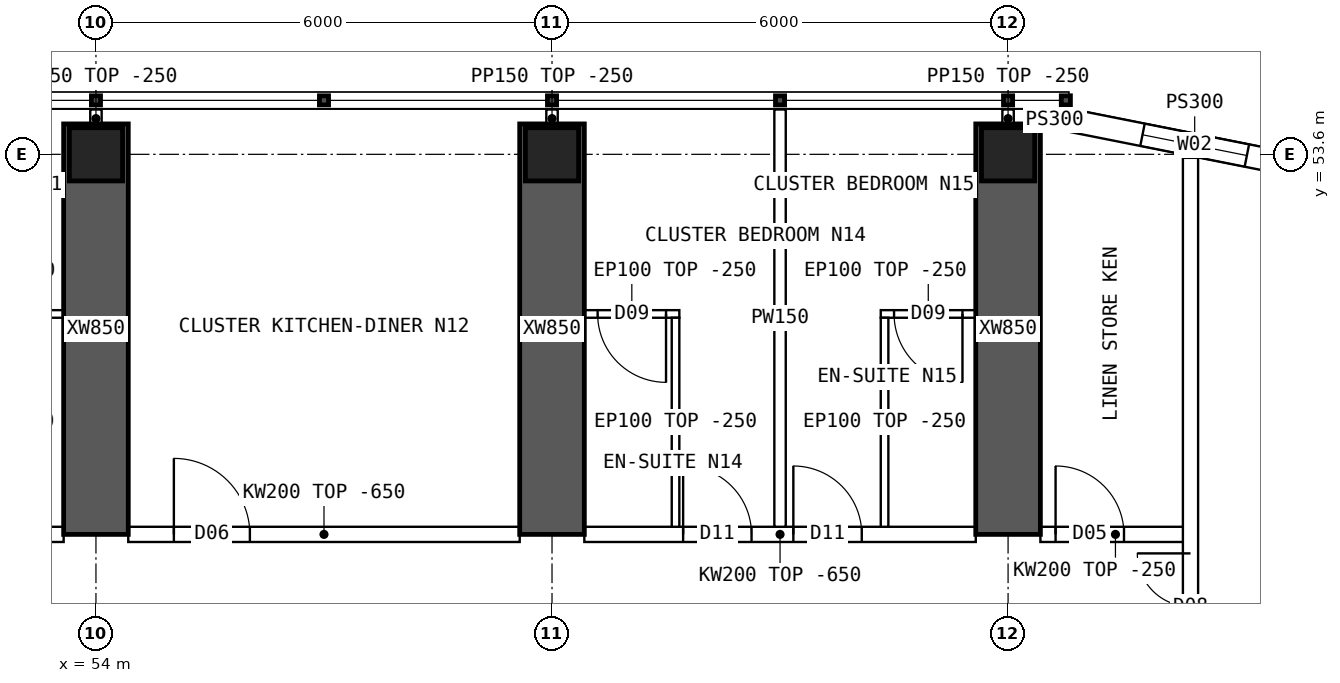
"""IFC4 building model, lengths in metres.
Left out: names, types, materials, properties, quantities, classifications, styles, units other than length and angle.
Written with IfcOpenShell. Run it as: python <this file> out.ifc"""

import sys

from ifc_helpers import new_model, si_unit, direction, frame, frame_2d, origin, origin_2d, place, context, subcontext, project, spatial, polyline, rectangle, hollow_rectangle, outline, extrude, element, fill, save


model = new_model("IFC4")
c1 = context("Model", 3, precision=1e-05, world=origin(), true_north=direction((0.0, 1.0)))
c2 = subcontext(c1, "Body", "Model", "MODEL_VIEW")
j1 = project(units=[si_unit("LENGTHUNIT", "METRE"), si_unit("PLANEANGLEUNIT", "RADIAN")], contexts=[c1])
p1 = place(None, origin())
s1 = spatial("IfcSite", under=j1, at=p1, CompositionType="ELEMENT")
p2 = place(p1, origin())
s2 = spatial("IfcBuilding", under=s1, at=p2, CompositionType="ELEMENT")
p3 = place(p2, frame((0.0, 0.0, 167.35)))
s3 = spatial("IfcBuildingStorey", under=s2, at=p3, CompositionType="ELEMENT", Elevation=167.35)
for number, where, z_axis, x_axis in (
    (1, (54.0, 53.6, 0.0), (0.0, 0.0, 1.0), (1.0, 0.0, 0.0)),
    (2, (60.0, 53.6, 0.0), (0.0, 0.0, 1.0), (1.0, 0.0, 0.0)),
    (3, (66.0, 53.6, 0.0), (0.0, 0.0, 1.0), (1.0, 0.0, 0.0)),
):
    element("IfcColumn", number, at=place(p3, frame(where, z_axis=z_axis, x_axis=x_axis)), inside=s3, PredefinedType="COLUMN", context=c2, shape_type="SweptSolid", body=[
        extrude(hollow_rectangle(XDim=0.7, YDim=0.7, WallThickness=0.07, at=origin_2d()), origin(), (0.0, 0.0, 1.0), 3.75),
    ])
for number, where, z_axis, x_axis in (
    (4, (54.0, 48.6, 0.0), (0.0, 0.0, 1.0), (0.0, 1.0, 0.0)),
    (5, (60.0, 48.6, 0.0), (0.0, 0.0, 1.0), (0.0, 1.0, 0.0)),
    (6, (66.0, 48.6, 0.0), (0.0, 0.0, 1.0), (0.0, 1.0, 0.0)),
):
    element("IfcWall", number, at=place(p3, frame(where, z_axis=z_axis, x_axis=x_axis)), inside=s3, PredefinedType="SHEAR", context=c2, shape_type="SweptSolid", body=[
        extrude(rectangle(XDim=5.4, YDim=0.85, at=frame_2d((2.7, 0.0))), origin(), (0.0, 0.0, 1.0), 3.75),
    ])
p4 = place(p3, frame((70.11, 53.392, 0.0), z_axis=(0.0, 0.0, 1.0), x_axis=(-0.98078325777, 0.195100490205, 0.0)))
e7 = element("IfcWall", 7, at=p4, inside=s3, PredefinedType="SOLIDWALL", context=c2, shape_type="SweptSolid", body=[
    extrude(outline(polyline([(-0.03, -0.15), (3.405, -0.15), (3.345, 0.15), (0.03, 0.15), (-0.03, -0.15)])), origin(), (0.0, 0.0, 1.0), 3.5),
])
p5 = place(p4, frame((0.988, 0.0, 0.9)))
e8 = element("IfcOpeningElement", 8, at=p5, cuts=e7, PredefinedType="OPENING", context=c2, shape_type="SweptSolid", body=[
    extrude(rectangle(XDim=1.4, YDim=1.8, at=frame_2d((0.7, 0.9))), frame((0.0, 0.16, 0.0), z_axis=(0.0, -1.0, 0.0), x_axis=(1.0, 0.0, 0.0)), (0.0, 0.0, 1.0), 0.32),
])
p6 = place(p3, frame((66.8, 54.05, 0.0), z_axis=(0.0, 0.0, 1.0), x_axis=(-1.0, 0.0, 0.0)))
e9 = element("IfcWall", 9, at=p6, inside=s3, PredefinedType="SOLIDWALL", context=c2, shape_type="SweptSolid", body=[
    extrude(rectangle(XDim=0.375, YDim=0.3, at=frame_2d((0.188, 0.0))), origin(), (0.0, 0.0, 1.0), 3.5),
])
p7 = place(p3, frame((48.425, 48.6, 0.0), z_axis=(0.0, 0.0, 1.0), x_axis=(1.0, 0.0, 0.0)))
e10 = element("IfcWall", 10, at=p7, inside=s3, PredefinedType="SOLIDWALL", context=c2, shape_type="SweptSolid", body=[
    extrude(outline(polyline([(0.0, 0.0), (5.15, 0.0), (5.15, 3.1), (0.0, 3.1), (0.0, 0.0)])), frame((0.0, 0.1, 0.0), z_axis=(0.0, -1.0, 0.0), x_axis=(1.0, 0.0, 0.0)), (0.0, 0.0, 1.0), 0.2),
])
p8 = place(p7, frame((1.3, 0.0, 0.0)))
e11 = element("IfcOpeningElement", 11, at=p8, cuts=e10, PredefinedType="OPENING", context=c2, shape_type="SweptSolid", body=[
    extrude(rectangle(XDim=0.9, YDim=2.1, at=frame_2d((0.45, 1.05))), frame((0.0, 0.11, 0.0), z_axis=(0.0, -1.0, 0.0), x_axis=(1.0, 0.0, 0.0)), (0.0, 0.0, 1.0), 0.22),
])
p9 = place(p7, frame((2.75, 0.0, 0.0)))
e12 = element("IfcOpeningElement", 12, at=p9, cuts=e10, PredefinedType="OPENING", context=c2, shape_type="SweptSolid", body=[
    extrude(rectangle(XDim=0.9, YDim=2.1, at=frame_2d((0.45, 1.05))), frame((0.0, 0.11, 0.0), z_axis=(0.0, -1.0, 0.0), x_axis=(1.0, 0.0, 0.0)), (0.0, 0.0, 1.0), 0.22),
])
p10 = place(p3, frame((54.425, 48.6, 0.0), z_axis=(0.0, 0.0, 1.0), x_axis=(1.0, 0.0, 0.0)))
e13 = element("IfcWall", 13, at=p10, inside=s3, PredefinedType="SOLIDWALL", context=c2, shape_type="SweptSolid", body=[
    extrude(outline(polyline([(0.0, 0.0), (5.15, 0.0), (5.15, 3.1), (0.0, 3.1), (0.0, 0.0)])), frame((0.0, 0.1, 0.0), z_axis=(0.0, -1.0, 0.0), x_axis=(1.0, 0.0, 0.0)), (0.0, 0.0, 1.0), 0.2),
])
p11 = place(p10, frame((0.6, 0.0, 0.0)))
e14 = element("IfcOpeningElement", 14, at=p11, cuts=e13, PredefinedType="OPENING", context=c2, shape_type="SweptSolid", body=[
    extrude(rectangle(XDim=1.0, YDim=2.1, at=frame_2d((0.5, 1.05))), frame((0.0, 0.11, 0.0), z_axis=(0.0, -1.0, 0.0), x_axis=(1.0, 0.0, 0.0)), (0.0, 0.0, 1.0), 0.22),
])
p12 = place(p3, frame((60.425, 48.6, 0.0), z_axis=(0.0, 0.0, 1.0), x_axis=(1.0, 0.0, 0.0)))
e15 = element("IfcWall", 15, at=p12, inside=s3, PredefinedType="SOLIDWALL", context=c2, shape_type="SweptSolid", body=[
    extrude(outline(polyline([(0.0, 0.0), (5.15, 0.0), (5.15, 3.1), (0.0, 3.1), (0.0, 0.0)])), frame((0.0, 0.1, 0.0), z_axis=(0.0, -1.0, 0.0), x_axis=(1.0, 0.0, 0.0)), (0.0, 0.0, 1.0), 0.2),
])
p13 = place(p12, frame((1.3, 0.0, 0.0)))
e16 = element("IfcOpeningElement", 16, at=p13, cuts=e15, PredefinedType="OPENING", context=c2, shape_type="SweptSolid", body=[
    extrude(rectangle(XDim=0.9, YDim=2.1, at=frame_2d((0.45, 1.05))), frame((0.0, 0.11, 0.0), z_axis=(0.0, -1.0, 0.0), x_axis=(1.0, 0.0, 0.0)), (0.0, 0.0, 1.0), 0.22),
])
p14 = place(p12, frame((2.75, 0.0, 0.0)))
e17 = element("IfcOpeningElement", 17, at=p14, cuts=e15, PredefinedType="OPENING", context=c2, shape_type="SweptSolid", body=[
    extrude(rectangle(XDim=0.9, YDim=2.1, at=frame_2d((0.45, 1.05))), frame((0.0, 0.11, 0.0), z_axis=(0.0, -1.0, 0.0), x_axis=(1.0, 0.0, 0.0)), (0.0, 0.0, 1.0), 0.22),
])
p15 = place(p3, frame((66.425, 48.6, 0.0), z_axis=(0.0, 0.0, 1.0), x_axis=(1.0, 0.0, 0.0)))
e18 = element("IfcWall", 18, at=p15, inside=s3, PredefinedType="SOLIDWALL", context=c2, shape_type="SweptSolid", body=[
    extrude(rectangle(XDim=1.975, YDim=0.2, at=frame_2d((0.987, 0.0))), origin(), (0.0, 0.0, 1.0), 3.5),
])
p16 = place(p15, frame((0.2, 0.0, 0.0)))
e19 = element("IfcOpeningElement", 19, at=p16, cuts=e18, PredefinedType="OPENING", context=c2, shape_type="SweptSolid", body=[
    extrude(rectangle(XDim=0.9, YDim=2.1, at=frame_2d((0.45, 1.05))), frame((0.0, 0.11, 0.0), z_axis=(0.0, -1.0, 0.0), x_axis=(1.0, 0.0, 0.0)), (0.0, 0.0, 1.0), 0.22),
])
p17 = place(p3, frame((52.325, 51.5, 0.0), z_axis=(0.0, 0.0, 1.0), x_axis=(1.0, 0.0, 0.0)))
e20 = element("IfcWall", 20, at=p17, inside=s3, PredefinedType="PARTITIONING", context=c2, shape_type="SweptSolid", body=[
    extrude(rectangle(XDim=1.25, YDim=0.1, at=frame_2d((0.625, 0.0))), origin(), (0.0, 0.0, 1.0), 3.5),
])
p18 = place(p17, frame((0.175, 0.0, 0.0)))
e21 = element("IfcOpeningElement", 21, at=p18, cuts=e20, PredefinedType="OPENING", context=c2, shape_type="SweptSolid", body=[
    extrude(rectangle(XDim=0.9, YDim=2.1, at=frame_2d((0.45, 1.05))), frame((0.0, 0.06, 0.0), z_axis=(0.0, -1.0, 0.0), x_axis=(1.0, 0.0, 0.0)), (0.0, 0.0, 1.0), 0.12),
])
p19 = place(p3, frame((63.0, 54.19, 0.0), z_axis=(0.0, 0.0, 1.0), x_axis=(0.0, -1.0, 0.0)))
e22 = element("IfcWall", 22, at=p19, inside=s3, PredefinedType="PARTITIONING", context=c2, shape_type="SweptSolid", body=[
    extrude(outline(polyline([(0.0, 0.0), (5.49, 0.0), (5.49, 3.1), (5.442, 3.1), (5.44, 3.5), (0.792, 3.5), (0.79, 3.1), (0.392, 3.1), (0.39, 3.5), (0.0, 3.5), (0.0, 0.0)])), frame((0.0, 0.075, 0.0), z_axis=(0.0, -1.0, 0.0), x_axis=(1.0, 0.0, 0.0)), (0.0, 0.0, 1.0), 0.15),
])
p20 = place(p3, frame((60.425, 51.5, 0.0), z_axis=(0.0, 0.0, 1.0), x_axis=(1.0, 0.0, 0.0)))
e23 = element("IfcWall", 23, at=p20, inside=s3, PredefinedType="PARTITIONING", context=c2, shape_type="SweptSolid", body=[
    extrude(rectangle(XDim=1.25, YDim=0.1, at=frame_2d((0.625, 0.0))), origin(), (0.0, 0.0, 1.0), 3.5),
])
p21 = place(p20, frame((0.175, 0.0, 0.0)))
e24 = element("IfcOpeningElement", 24, at=p21, cuts=e23, PredefinedType="OPENING", context=c2, shape_type="SweptSolid", body=[
    extrude(rectangle(XDim=0.9, YDim=2.1, at=frame_2d((0.45, 1.05))), frame((0.0, 0.06, 0.0), z_axis=(0.0, -1.0, 0.0), x_axis=(1.0, 0.0, 0.0)), (0.0, 0.0, 1.0), 0.12),
])
p22 = place(p3, frame((61.625, 51.45, 0.0), z_axis=(0.0, 0.0, 1.0), x_axis=(0.0, -1.0, 0.0)))
e25 = element("IfcWall", 25, at=p22, inside=s3, PredefinedType="PARTITIONING", context=c2, shape_type="SweptSolid", body=[
    extrude(outline(polyline([(0.0, 0.0), (2.75, 0.0), (2.75, 3.1), (2.702, 3.1), (2.7, 3.5), (0.0, 3.5), (0.0, 0.0)])), frame((0.0, 0.05, 0.0), z_axis=(0.0, -1.0, 0.0), x_axis=(1.0, 0.0, 0.0)), (0.0, 0.0, 1.0), 0.1),
])
p23 = place(p3, frame((64.325, 51.5, 0.0), z_axis=(0.0, 0.0, 1.0), x_axis=(1.0, 0.0, 0.0)))
e26 = element("IfcWall", 26, at=p23, inside=s3, PredefinedType="PARTITIONING", context=c2, shape_type="SweptSolid", body=[
    extrude(rectangle(XDim=1.25, YDim=0.1, at=frame_2d((0.625, 0.0))), origin(), (0.0, 0.0, 1.0), 3.5),
])
p24 = place(p23, frame((0.175, 0.0, 0.0)))
e27 = element("IfcOpeningElement", 27, at=p24, cuts=e26, PredefinedType="OPENING", context=c2, shape_type="SweptSolid", body=[
    extrude(rectangle(XDim=0.9, YDim=2.1, at=frame_2d((0.45, 1.05))), frame((0.0, 0.06, 0.0), z_axis=(0.0, -1.0, 0.0), x_axis=(1.0, 0.0, 0.0)), (0.0, 0.0, 1.0), 0.12),
])
p25 = place(p3, frame((64.375, 51.45, 0.0), z_axis=(0.0, 0.0, 1.0), x_axis=(0.0, -1.0, 0.0)))
e28 = element("IfcWall", 28, at=p25, inside=s3, PredefinedType="PARTITIONING", context=c2, shape_type="SweptSolid", body=[
    extrude(outline(polyline([(0.0, 0.0), (2.75, 0.0), (2.75, 3.1), (2.702, 3.1), (2.7, 3.5), (0.0, 3.5), (0.0, 0.0)])), frame((0.0, 0.05, 0.0), z_axis=(0.0, -1.0, 0.0), x_axis=(1.0, 0.0, 0.0)), (0.0, 0.0, 1.0), 0.1),
])
p26 = place(p3, frame((68.4, 10.446, 0.0), z_axis=(0.0, 0.0, 1.0), x_axis=(0.0, 1.0, 0.0)))
e29 = element("IfcWall", 29, at=p26, inside=s3, PredefinedType="SOLIDWALL", context=c2, shape_type="SweptSolid", body=[
    extrude(rectangle(XDim=43.107, YDim=0.2, at=frame_2d((21.554, 0.0))), origin(), (0.0, 0.0, 1.0), 3.5),
])
p27 = place(p26, frame((13.914, 0.0, 0.0)))
e30 = element("IfcOpeningElement", 30, at=p27, cuts=e29, PredefinedType="OPENING", context=c2, shape_type="SweptSolid", body=[
    extrude(rectangle(XDim=1.2, YDim=2.1, at=frame_2d((0.6, 1.05))), frame((0.0, 0.11, 0.0), z_axis=(0.0, -1.0, 0.0), x_axis=(1.0, 0.0, 0.0)), (0.0, 0.0, 1.0), 0.22),
])
p28 = place(p26, frame((22.634, 0.0, 0.0)))
e31 = element("IfcOpeningElement", 31, at=p28, cuts=e29, PredefinedType="OPENING", context=c2, shape_type="SweptSolid", body=[
    extrude(rectangle(XDim=1.2, YDim=2.1, at=frame_2d((0.6, 1.05))), frame((0.0, 0.11, 0.0), z_axis=(0.0, -1.0, 0.0), x_axis=(1.0, 0.0, 0.0)), (0.0, 0.0, 1.0), 0.22),
])
p29 = place(p26, frame((5.104, 0.0, 0.0)))
e32 = element("IfcOpeningElement", 32, at=p29, cuts=e29, PredefinedType="OPENING", context=c2, shape_type="SweptSolid", body=[
    extrude(rectangle(XDim=1.4, YDim=2.1, at=frame_2d((0.7, 1.05))), frame((0.0, 0.11, 0.0), z_axis=(0.0, -1.0, 0.0), x_axis=(1.0, 0.0, 0.0)), (0.0, 0.0, 1.0), 0.22),
])
p30 = place(p26, frame((36.504, 0.0, 0.0)))
e33 = element("IfcOpeningElement", 33, at=p30, cuts=e29, PredefinedType="OPENING", context=c2, shape_type="SweptSolid", body=[
    extrude(rectangle(XDim=1.4, YDim=2.1, at=frame_2d((0.7, 1.05))), frame((0.0, 0.11, 0.0), z_axis=(0.0, -1.0, 0.0), x_axis=(1.0, 0.0, 0.0)), (0.0, 0.0, 1.0), 0.22),
])
for number, where, z_axis, x_axis in (
    (34, (54.0, 53.95, 0.0), (0.0, 0.0, 1.0), (0.0, 1.0, 0.0)),
    (35, (60.0, 53.95, 0.0), (0.0, 0.0, 1.0), (0.0, 1.0, 0.0)),
    (36, (66.0, 53.95, 0.0), (0.0, 0.0, 1.0), (0.0, 1.0, 0.0)),
):
    element("IfcWall", number, at=place(p3, frame(where, z_axis=z_axis, x_axis=x_axis)), inside=s3, PredefinedType="PARTITIONING", context=c2, shape_type="SweptSolid", body=[
        extrude(rectangle(XDim=0.24, YDim=0.15, at=frame_2d((0.12, 0.0))), origin(), (0.0, 0.0, 1.0), 3.5),
    ])
p31 = place(p5, origin())
e37 = element("IfcWindow", 37, at=p31, inside=s3, PartitioningType="SINGLE_PANEL", PredefinedType="WINDOW", context=c2, shape_type="SweptSolid", body=[
    extrude(rectangle(XDim=1.4, YDim=1.8, at=frame_2d((0.7, 0.9))), frame((0.0, 0.03, 0.0), z_axis=(0.0, -1.0, 0.0), x_axis=(1.0, 0.0, 0.0)), (0.0, 0.0, 1.0), 0.06),
])
fill(e8, e37)
p32 = place(p11, origin())
e38 = element("IfcDoor", 38, at=p32, inside=s3, OperationType="SINGLE_SWING_LEFT", PredefinedType="DOOR", context=c2, shape_type="SweptSolid", body=[
    extrude(rectangle(XDim=1.0, YDim=2.1, at=frame_2d((0.5, 1.05))), frame((0.0, 0.025, 0.0), z_axis=(0.0, -1.0, 0.0), x_axis=(1.0, 0.0, 0.0)), (0.0, 0.0, 1.0), 0.05),
])
fill(e14, e38)
p33 = place(p21, origin())
e39 = element("IfcDoor", 39, at=p33, inside=s3, OperationType="SINGLE_SWING_RIGHT", PredefinedType="DOOR", context=c2, shape_type="SweptSolid", body=[
    extrude(rectangle(XDim=0.9, YDim=2.1, at=frame_2d((0.45, 1.05))), frame((0.0, 0.025, 0.0), z_axis=(0.0, -1.0, 0.0), x_axis=(1.0, 0.0, 0.0)), (0.0, 0.0, 1.0), 0.05),
])
fill(e24, e39)
p34 = place(p13, origin())
e40 = element("IfcDoor", 40, at=p34, inside=s3, OperationType="SINGLE_SWING_LEFT", PredefinedType="DOOR", context=c2, shape_type="SweptSolid", body=[
    extrude(rectangle(XDim=0.9, YDim=2.1, at=frame_2d((0.45, 1.05))), frame((0.0, 0.025, 0.0), z_axis=(0.0, -1.0, 0.0), x_axis=(1.0, 0.0, 0.0)), (0.0, 0.0, 1.0), 0.05),
])
fill(e16, e40)
p35 = place(p24, origin())
e41 = element("IfcDoor", 41, at=p35, inside=s3, OperationType="SINGLE_SWING_RIGHT", PredefinedType="DOOR", context=c2, shape_type="SweptSolid", body=[
    extrude(rectangle(XDim=0.9, YDim=2.1, at=frame_2d((0.45, 1.05))), frame((0.0, 0.025, 0.0), z_axis=(0.0, -1.0, 0.0), x_axis=(1.0, 0.0, 0.0)), (0.0, 0.0, 1.0), 0.05),
])
fill(e27, e41)
p36 = place(p14, origin())
e42 = element("IfcDoor", 42, at=p36, inside=s3, OperationType="SINGLE_SWING_LEFT", PredefinedType="DOOR", context=c2, shape_type="SweptSolid", body=[
    extrude(rectangle(XDim=0.9, YDim=2.1, at=frame_2d((0.45, 1.05))), frame((0.0, 0.025, 0.0), z_axis=(0.0, -1.0, 0.0), x_axis=(1.0, 0.0, 0.0)), (0.0, 0.0, 1.0), 0.05),
])
fill(e17, e42)
p37 = place(p30, origin())
e43 = element("IfcDoor", 43, at=p37, inside=s3, OperationType="DOUBLE_DOOR_SINGLE_SWING", PredefinedType="DOOR", context=c2, shape_type="SweptSolid", body=[
    extrude(rectangle(XDim=1.4, YDim=2.1, at=frame_2d((0.7, 1.05))), frame((0.0, 0.025, 0.0), z_axis=(0.0, -1.0, 0.0), x_axis=(1.0, 0.0, 0.0)), (0.0, 0.0, 1.0), 0.05),
])
fill(e33, e43)
p38 = place(p16, origin())
e44 = element("IfcDoor", 44, at=p38, inside=s3, OperationType="SINGLE_SWING_LEFT", PredefinedType="DOOR", context=c2, shape_type="SweptSolid", body=[
    extrude(rectangle(XDim=0.9, YDim=2.1, at=frame_2d((0.45, 1.05))), frame((0.0, 0.025, 0.0), z_axis=(0.0, -1.0, 0.0), x_axis=(1.0, 0.0, 0.0)), (0.0, 0.0, 1.0), 0.05),
])
fill(e19, e44)
save(model, sys.argv[1])
